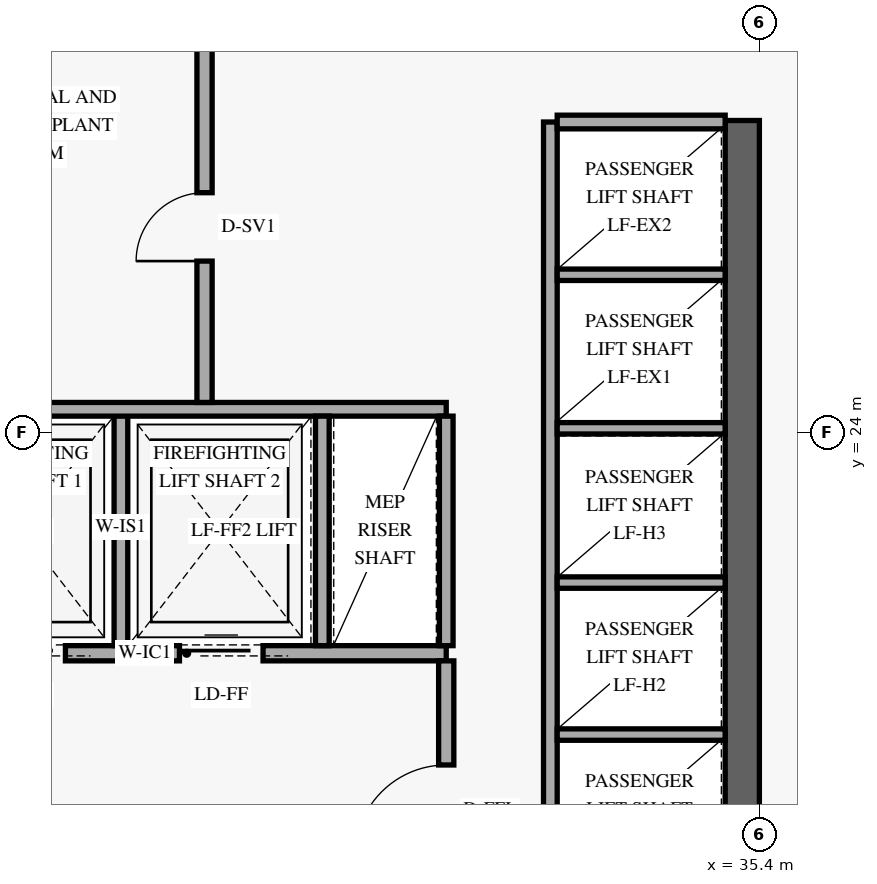
"""IFC4 building model, lengths in metres.
Left out: names, types, materials, properties, quantities, classifications, styles, units other than length and angle.
Written with IfcOpenShell. Run it as: python <this file> out.ifc"""

import sys

from ifc_helpers import new_model, si_unit, direction, frame, frame_2d, origin, place, context, subcontext, project, spatial, rectangle, extrude, element, fill, save


model = new_model("IFC4")
c1 = context("Model", 3, precision=1e-05, world=origin(), true_north=direction((0.0, 1.0)))
c2 = subcontext(c1, "Body", "Model", "MODEL_VIEW")
j1 = project(units=[si_unit("LENGTHUNIT", "METRE"), si_unit("PLANEANGLEUNIT", "RADIAN")], contexts=[c1])
p1 = place(None, origin())
s1 = spatial("IfcSite", under=j1, at=p1, CompositionType="ELEMENT")
p2 = place(p1, origin())
s2 = spatial("IfcBuilding", under=s1, at=p2, CompositionType="ELEMENT")
p3 = place(p2, frame((0.0, 0.0, 4.8)))
s3 = spatial("IfcBuildingStorey", under=s2, at=p3, CompositionType="ELEMENT", Elevation=4.8)
p4 = place(p3, frame((35.175, 18.05, 0.0), z_axis=(0.0, 0.0, 1.0), x_axis=(0.0, 1.0, 0.0)))
e1 = element("IfcWall", 1, at=p4, inside=s3, PredefinedType="SHEAR", context=c2, shape_type="SweptSolid", body=[
    extrude(rectangle(XDim=10.05, YDim=0.45, at=frame_2d((5.025, 0.0))), origin(), (0.0, 0.0, 1.0), 3.75),
])
p5 = place(p3, frame((24.45, 21.09, 0.0), z_axis=(0.0, 0.0, 1.0), x_axis=(1.0, 0.0, 0.0)))
e2 = element("IfcWall", 2, at=p5, inside=s3, PredefinedType="STANDARD", context=c2, shape_type="SweptSolid", body=[
    extrude(rectangle(XDim=6.83, YDim=0.2, at=frame_2d((3.415, 0.0))), origin(), (0.0, 0.0, 1.0), 4.52),
])
p6 = place(p5, frame((0.72, 0.0, 0.0)))
e3 = element("IfcOpeningElement", 3, at=p6, cuts=e2, PredefinedType="OPENING", context=c2, shape_type="SweptSolid", body=[
    extrude(rectangle(XDim=1.1, YDim=2.2, at=frame_2d((0.55, 1.1))), frame((0.0, 0.11, 0.0), z_axis=(0.0, -1.0, 0.0), x_axis=(1.0, 0.0, 0.0)), (0.0, 0.0, 1.0), 0.22),
])
p7 = place(p5, frame((3.32, 0.0, 0.0)))
e4 = element("IfcOpeningElement", 4, at=p7, cuts=e2, PredefinedType="OPENING", context=c2, shape_type="SweptSolid", body=[
    extrude(rectangle(XDim=1.1, YDim=2.2, at=frame_2d((0.55, 1.1))), frame((0.0, 0.11, 0.0), z_axis=(0.0, -1.0, 0.0), x_axis=(1.0, 0.0, 0.0)), (0.0, 0.0, 1.0), 0.22),
])
p8 = place(p3, frame((31.28, 17.07, 0.0), z_axis=(0.0, 0.0, 1.0), x_axis=(0.0, 1.0, 0.0)))
e5 = element("IfcWall", 5, at=p8, inside=s3, PredefinedType="STANDARD", context=c2, shape_type="SweptSolid", body=[
    extrude(rectangle(XDim=3.92, YDim=0.2, at=frame_2d((1.96, 0.0))), origin(), (0.0, 0.0, 1.0), 3.502),
])
p9 = place(p8, frame((1.35, 0.0, 0.0)))
e6 = element("IfcOpeningElement", 6, at=p9, cuts=e5, PredefinedType="OPENING", context=c2, shape_type="SweptSolid", body=[
    extrude(rectangle(XDim=1.2, YDim=2.15, at=frame_2d((0.6, 1.075))), frame((0.0, 0.11, 0.0), z_axis=(0.0, -1.0, 0.0), x_axis=(1.0, 0.0, 0.0)), (0.0, 0.0, 1.0), 0.22),
])
p10 = place(p3, frame((27.0, 21.19, 0.0), z_axis=(0.0, 0.0, 1.0), x_axis=(0.0, 1.0, 0.0)))
e7 = element("IfcWall", 7, at=p10, inside=s3, PredefinedType="STANDARD", context=c2, shape_type="SweptSolid", body=[
    extrude(rectangle(XDim=3.11, YDim=0.18, at=frame_2d((1.555, 0.0))), origin(), (0.0, 0.0, 1.0), 4.52),
])
p11 = place(p3, frame((24.45, 24.3, 0.0), z_axis=(0.0, 0.0, 1.0), x_axis=(1.0, 0.0, 0.0)))
e8 = element("IfcWall", 8, at=p11, inside=s3, PredefinedType="STANDARD", context=c2, shape_type="SweptSolid", body=[
    extrude(rectangle(XDim=6.83, YDim=0.18, at=frame_2d((3.415, 0.0))), origin(), (0.0, 0.0, 1.0), 4.52),
])
for number, where, z_axis, x_axis in (
    (9, (29.65, 21.19, 0.0), (0.0, 0.0, 1.0), (0.0, 1.0, 0.0)),
    (10, (31.28, 21.19, 0.0), (0.0, 0.0, 1.0), (0.0, 1.0, 0.0)),
):
    element("IfcWall", number, at=place(p3, frame(where, z_axis=z_axis, x_axis=x_axis)), inside=s3, PredefinedType="STANDARD", context=c2, shape_type="SweptSolid", body=[
        extrude(rectangle(XDim=3.02, YDim=0.18, at=frame_2d((1.51, 0.0))), origin(), (0.0, 0.0, 1.0), 4.52),
    ])
p12 = place(p3, frame((28.1, 24.39, 0.0), z_axis=(0.0, 0.0, 1.0), x_axis=(0.0, 1.0, 0.0)))
e11 = element("IfcWall", 11, at=p12, inside=s3, PredefinedType="STANDARD", context=c2, shape_type="SweptSolid", body=[
    extrude(rectangle(XDim=4.75, YDim=0.2, at=frame_2d((2.375, 0.0))), origin(), (0.0, 0.0, 1.0), 4.52),
])
p13 = place(p12, frame((1.86, 0.0, 0.0)))
e12 = element("IfcOpeningElement", 12, at=p13, cuts=e11, PredefinedType="OPENING", context=c2, shape_type="SweptSolid", body=[
    extrude(rectangle(XDim=0.9, YDim=2.1, at=frame_2d((0.45, 1.05))), frame((0.0, 0.11, 0.0), z_axis=(0.0, -1.0, 0.0), x_axis=(1.0, 0.0, 0.0)), (0.0, 0.0, 1.0), 0.22),
])
p14 = place(p3, frame((32.65, 18.02, 0.0), z_axis=(0.0, 0.0, 1.0), x_axis=(0.0, 1.0, 0.0)))
e13 = element("IfcWall", 13, at=p14, inside=s3, PredefinedType="STANDARD", context=c2, shape_type="SweptSolid", body=[
    extrude(rectangle(XDim=10.06, YDim=0.18, at=frame_2d((5.03, 0.0))), origin(), (0.0, 0.0, 1.0), 4.52),
])
p15 = place(p3, frame((32.74, 28.08, 0.0), z_axis=(0.0, 0.0, 1.0), x_axis=(1.0, 0.0, 0.0)))
e14 = element("IfcWall", 14, at=p15, inside=s3, PredefinedType="STANDARD", context=c2, shape_type="SweptSolid", body=[
    extrude(rectangle(XDim=2.21, YDim=0.18, at=frame_2d((1.105, 0.0))), origin(), (0.0, 0.0, 1.0), 4.52),
])
for number, where, z_axis, x_axis in (
    (15, (32.74, 20.02, 0.0), (0.0, 0.0, 1.0), (1.0, 0.0, 0.0)),
    (16, (32.74, 22.02, 0.0), (0.0, 0.0, 1.0), (1.0, 0.0, 0.0)),
    (17, (32.74, 24.05, 0.0), (0.0, 0.0, 1.0), (1.0, 0.0, 0.0)),
    (18, (32.74, 26.07, 0.0), (0.0, 0.0, 1.0), (1.0, 0.0, 0.0)),
):
    element("IfcWall", number, at=place(p3, frame(where, z_axis=z_axis, x_axis=x_axis)), inside=s3, PredefinedType="STANDARD", context=c2, shape_type="SweptSolid", body=[
        extrude(rectangle(XDim=2.21, YDim=0.15, at=frame_2d((1.105, 0.0))), origin(), (0.0, 0.0, 1.0), 4.52),
    ])
p16 = place(p6, origin())
e19 = element("IfcDoor", 19, at=p16, inside=s3, OperationType="SLIDING_TO_LEFT", PredefinedType="DOOR", context=c2, shape_type="SweptSolid", body=[
    extrude(rectangle(XDim=1.1, YDim=2.2, at=frame_2d((0.55, 1.1))), frame((0.0, 0.025, 0.0), z_axis=(0.0, -1.0, 0.0), x_axis=(1.0, 0.0, 0.0)), (0.0, 0.0, 1.0), 0.05),
])
fill(e3, e19)
p17 = place(p7, origin())
e20 = element("IfcDoor", 20, at=p17, inside=s3, OperationType="SLIDING_TO_LEFT", PredefinedType="DOOR", context=c2, shape_type="SweptSolid", body=[
    extrude(rectangle(XDim=1.1, YDim=2.2, at=frame_2d((0.55, 1.1))), frame((0.0, 0.025, 0.0), z_axis=(0.0, -1.0, 0.0), x_axis=(1.0, 0.0, 0.0)), (0.0, 0.0, 1.0), 0.05),
])
fill(e4, e20)
p18 = place(p9, origin())
e21 = element("IfcDoor", 21, at=p18, inside=s3, OperationType="SINGLE_SWING_LEFT", PredefinedType="DOOR", context=c2, shape_type="SweptSolid", body=[
    extrude(rectangle(XDim=1.2, YDim=2.15, at=frame_2d((0.6, 1.075))), frame((0.0, 0.025, 0.0), z_axis=(0.0, -1.0, 0.0), x_axis=(1.0, 0.0, 0.0)), (0.0, 0.0, 1.0), 0.05),
])
fill(e6, e21)
p19 = place(p13, origin())
e22 = element("IfcDoor", 22, at=p19, inside=s3, OperationType="SINGLE_SWING_LEFT", PredefinedType="DOOR", context=c2, shape_type="SweptSolid", body=[
    extrude(rectangle(XDim=0.9, YDim=2.1, at=frame_2d((0.45, 1.05))), frame((0.0, 0.025, 0.0), z_axis=(0.0, -1.0, 0.0), x_axis=(1.0, 0.0, 0.0)), (0.0, 0.0, 1.0), 0.05),
])
fill(e12, e22)
save(model, sys.argv[1])
